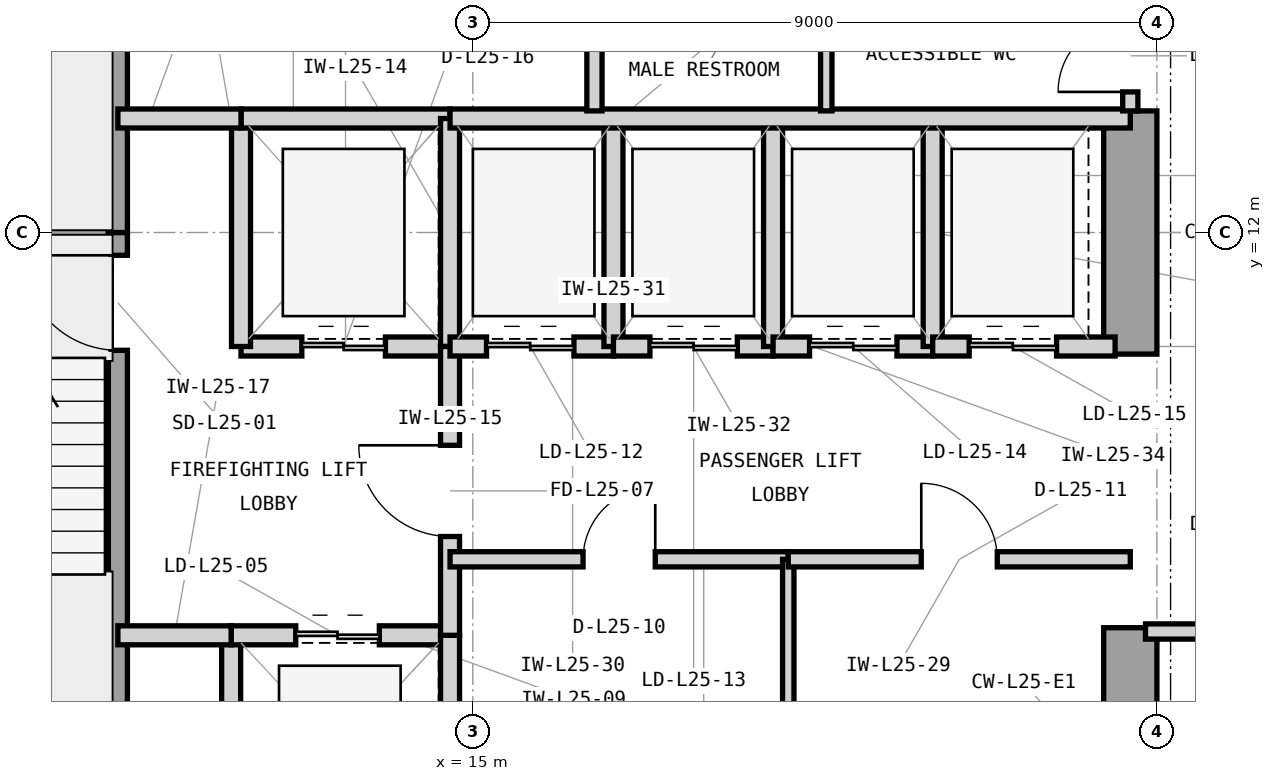
"""IFC4 building model, lengths in metres.
Left out: names, types, materials, properties, quantities, classifications, styles, units other than length and angle.
Written with IfcOpenShell. Run it as: python <this file> out.ifc"""

import sys

from ifc_helpers import new_model, si_unit, direction, frame, frame_2d, origin, place, context, subcontext, project, spatial, rectangle, extrude, element, fill, save


model = new_model("IFC4")
c1 = context("Model", 3, precision=1e-05, world=origin(), true_north=direction((0.0, 1.0)))
c2 = subcontext(c1, "Body", "Model", "MODEL_VIEW")
j1 = project(units=[si_unit("LENGTHUNIT", "METRE"), si_unit("PLANEANGLEUNIT", "RADIAN")], contexts=[c1])
p1 = place(None, origin())
s1 = spatial("IfcSite", under=j1, at=p1, CompositionType="ELEMENT")
p2 = place(p1, origin())
s2 = spatial("IfcBuilding", under=s1, at=p2, CompositionType="ELEMENT")
p3 = place(p2, frame((0.0, 0.0, 108.9)))
s3 = spatial("IfcBuildingStorey", under=s2, at=p3, CompositionType="ELEMENT", Elevation=108.9)
p4 = place(p3, frame((23.65, 3.7, 0.0), z_axis=(0.0, 0.0, 1.0), x_axis=(0.0, 1.0, 0.0)))
e1 = element("IfcWall", 1, at=p4, inside=s3, PredefinedType="SHEAR", context=c2, shape_type="SweptSolid", body=[
    extrude(rectangle(XDim=3.1, YDim=0.7, at=frame_2d((1.55, 0.0))), origin(), (0.0, 0.0, 1.0), 3.9),
])
p5 = place(p3, frame((23.65, 10.4, 0.0), z_axis=(0.0, 0.0, 1.0), x_axis=(0.0, 1.0, 0.0)))
e2 = element("IfcWall", 2, at=p5, inside=s3, PredefinedType="SHEAR", context=c2, shape_type="SweptSolid", body=[
    extrude(rectangle(XDim=3.2, YDim=0.7, at=frame_2d((1.6, 0.0))), origin(), (0.0, 0.0, 1.0), 3.9),
])
p6 = place(p3, frame((6.35, 12.0, 0.0), z_axis=(0.0, 0.0, 1.0), x_axis=(1.0, 0.0, 0.0)))
e3 = element("IfcWall", 3, at=p6, inside=s3, PredefinedType="SHEAR", context=c2, shape_type="SweptSolid", body=[
    extrude(rectangle(XDim=4.105, YDim=0.25, at=frame_2d((2.052, 0.0))), origin(), (0.0, 0.0, 1.0), 3.9),
])
p7 = place(p3, frame((10.33, 4.55, 0.0), z_axis=(0.0, 0.0, 1.0), x_axis=(0.0, 1.0, 0.0)))
e4 = element("IfcWall", 4, at=p7, inside=s3, PredefinedType="SHEAR", context=c2, shape_type="SweptSolid", body=[
    extrude(rectangle(XDim=7.45, YDim=0.25, at=frame_2d((3.725, 0.0))), origin(), (0.0, 0.0, 1.0), 3.9),
])
p8 = place(p7, frame((5.9, 0.0, 0.0)))
e5 = element("IfcOpeningElement", 5, at=p8, cuts=e4, PredefinedType="OPENING", context=c2, shape_type="SweptSolid", body=[
    extrude(rectangle(XDim=1.25, YDim=2.2, at=frame_2d((0.625, 1.1))), frame((0.0, 0.135, 0.0), z_axis=(0.0, -1.0, 0.0), x_axis=(1.0, 0.0, 0.0)), (0.0, 0.0, 1.0), 0.27),
])
p9 = place(p3, frame((10.33, 12.0, 0.0), z_axis=(0.0, 0.0, 1.0), x_axis=(0.0, 1.0, 0.0)))
e6 = element("IfcWall", 6, at=p9, inside=s3, PredefinedType="SHEAR", context=c2, shape_type="SweptSolid", body=[
    extrude(rectangle(XDim=7.45, YDim=0.25, at=frame_2d((3.725, 0.0))), origin(), (0.0, 0.0, 1.0), 3.9),
])
p10 = place(p9, frame((5.85, 0.0, 0.0)))
e7 = element("IfcOpeningElement", 7, at=p10, cuts=e6, PredefinedType="OPENING", context=c2, shape_type="SweptSolid", body=[
    extrude(rectangle(XDim=1.25, YDim=2.2, at=frame_2d((0.625, 1.1))), frame((0.0, 0.135, 0.0), z_axis=(0.0, -1.0, 0.0), x_axis=(1.0, 0.0, 0.0)), (0.0, 0.0, 1.0), 0.27),
])
p11 = place(p3, frame((11.82, 3.35, 0.0), z_axis=(0.0, 0.0, 1.0), x_axis=(0.0, 1.0, 0.0)))
e8 = element("IfcWall", 8, at=p11, inside=s3, PredefinedType="PARTITIONING", context=c2, shape_type="SweptSolid", body=[
    extrude(rectangle(XDim=3.35, YDim=0.25, at=frame_2d((1.675, 0.0))), origin(), (0.0, 0.0, 1.0), 3.69),
])
p12 = place(p3, frame((11.82, 6.7, 0.0), z_axis=(0.0, 0.0, 1.0), x_axis=(1.0, 0.0, 0.0)))
e9 = element("IfcWall", 9, at=p12, inside=s3, PredefinedType="PARTITIONING", context=c2, shape_type="SweptSolid", body=[
    extrude(rectangle(XDim=2.88, YDim=0.25, at=frame_2d((1.44, 0.0))), origin(), (0.0, 0.0, 1.0), 3.227),
])
p13 = place(p12, frame((0.85, 0.0, 0.0)))
e10 = element("IfcOpeningElement", 10, at=p13, cuts=e9, PredefinedType="OPENING", context=c2, shape_type="SweptSolid", body=[
    extrude(rectangle(XDim=1.1, YDim=2.25, at=frame_2d((0.55, 1.125))), frame((0.0, 0.135, 0.0), z_axis=(0.0, -1.0, 0.0), x_axis=(1.0, 0.0, 0.0)), (0.0, 0.0, 1.0), 0.27),
])
p14 = place(p3, frame((14.7, 3.35, 0.0), z_axis=(0.0, 0.0, 1.0), x_axis=(0.0, 1.0, 0.0)))
e11 = element("IfcWall", 11, at=p14, inside=s3, PredefinedType="PARTITIONING", context=c2, shape_type="SweptSolid", body=[
    extrude(rectangle(XDim=3.35, YDim=0.25, at=frame_2d((1.675, 0.0))), origin(), (0.0, 0.0, 1.0), 3.69),
])
p15 = place(p3, frame((11.95, 10.5, 0.0), z_axis=(0.0, 0.0, 1.0), x_axis=(1.0, 0.0, 0.0)))
e12 = element("IfcWall", 12, at=p15, inside=s3, PredefinedType="PARTITIONING", context=c2, shape_type="SweptSolid", body=[
    extrude(rectangle(XDim=2.75, YDim=0.25, at=frame_2d((1.375, 0.0))), origin(), (0.0, 0.0, 1.0), 3.227),
])
p16 = place(p15, frame((0.8, 0.0, 0.0)))
e13 = element("IfcOpeningElement", 13, at=p16, cuts=e12, PredefinedType="OPENING", context=c2, shape_type="SweptSolid", body=[
    extrude(rectangle(XDim=1.1, YDim=2.25, at=frame_2d((0.55, 1.125))), frame((0.0, 0.135, 0.0), z_axis=(0.0, -1.0, 0.0), x_axis=(1.0, 0.0, 0.0)), (0.0, 0.0, 1.0), 0.27),
])
p17 = place(p3, frame((11.95, 10.5, 0.0), z_axis=(0.0, 0.0, 1.0), x_axis=(0.0, 1.0, 0.0)))
e14 = element("IfcWall", 14, at=p17, inside=s3, PredefinedType="PARTITIONING", context=c2, shape_type="SweptSolid", body=[
    extrude(rectangle(XDim=3.0, YDim=0.25, at=frame_2d((1.5, 0.0))), origin(), (0.0, 0.0, 1.0), 3.69),
])
p18 = place(p3, frame((11.95, 13.5, 0.0), z_axis=(0.0, 0.0, 1.0), x_axis=(1.0, 0.0, 0.0)))
e15 = element("IfcWall", 15, at=p18, inside=s3, PredefinedType="PARTITIONING", context=c2, shape_type="SweptSolid", body=[
    extrude(rectangle(XDim=2.75, YDim=0.25, at=frame_2d((1.375, 0.0))), origin(), (0.0, 0.0, 1.0), 3.227),
])
p19 = place(p3, frame((14.7, 10.5, 0.0), z_axis=(0.0, 0.0, 1.0), x_axis=(0.0, 1.0, 0.0)))
e16 = element("IfcWall", 16, at=p19, inside=s3, PredefinedType="PARTITIONING", context=c2, shape_type="SweptSolid", body=[
    extrude(rectangle(XDim=3.0, YDim=0.25, at=frame_2d((1.5, 0.0))), origin(), (0.0, 0.0, 1.0), 3.69),
])
p20 = place(p3, frame((14.7, 6.7, 0.0), z_axis=(0.0, 0.0, 1.0), x_axis=(0.0, 1.0, 0.0)))
e17 = element("IfcWall", 17, at=p20, inside=s3, PredefinedType="PARTITIONING", context=c2, shape_type="SweptSolid", body=[
    extrude(rectangle(XDim=3.8, YDim=0.25, at=frame_2d((1.9, 0.0))), origin(), (0.0, 0.0, 1.0), 3.69),
])
p21 = place(p20, frame((1.3, 0.0, 0.0)))
e18 = element("IfcOpeningElement", 18, at=p21, cuts=e17, PredefinedType="OPENING", context=c2, shape_type="SweptSolid", body=[
    extrude(rectangle(XDim=1.2, YDim=2.2, at=frame_2d((0.6, 1.1))), frame((0.0, 0.135, 0.0), z_axis=(0.0, -1.0, 0.0), x_axis=(1.0, 0.0, 0.0)), (0.0, 0.0, 1.0), 0.27),
])
p22 = place(p3, frame((10.33, 13.5, 0.0), z_axis=(0.0, 0.0, 1.0), x_axis=(1.0, 0.0, 0.0)))
e19 = element("IfcWall", 19, at=p22, inside=s3, PredefinedType="PARTITIONING", context=c2, shape_type="SweptSolid", body=[
    extrude(rectangle(XDim=1.62, YDim=0.25, at=frame_2d((0.81, 0.0))), origin(), (0.0, 0.0, 1.0), 3.227),
])
p23 = place(p3, frame((10.33, 6.7, 0.0), z_axis=(0.0, 0.0, 1.0), x_axis=(1.0, 0.0, 0.0)))
e20 = element("IfcWall", 20, at=p23, inside=s3, PredefinedType="PARTITIONING", context=c2, shape_type="SweptSolid", body=[
    extrude(rectangle(XDim=1.49, YDim=0.25, at=frame_2d((0.745, 0.0))), origin(), (0.0, 0.0, 1.0), 3.227),
])
p24 = place(p3, frame((14.7, 7.7, 0.0), z_axis=(0.0, 0.0, 1.0), x_axis=(1.0, 0.0, 0.0)))
e21 = element("IfcWall", 21, at=p24, inside=s3, PredefinedType="PARTITIONING", context=c2, shape_type="SweptSolid", body=[
    extrude(rectangle(XDim=4.45, YDim=0.2, at=frame_2d((2.225, 0.0))), origin(), (0.0, 0.0, 1.0), 3.69),
])
p25 = place(p24, frame((1.75, 0.0, 0.0)))
e22 = element("IfcOpeningElement", 22, at=p25, cuts=e21, PredefinedType="OPENING", context=c2, shape_type="SweptSolid", body=[
    extrude(rectangle(XDim=0.95, YDim=2.1, at=frame_2d((0.475, 1.05))), frame((0.0, 0.11, 0.0), z_axis=(0.0, -1.0, 0.0), x_axis=(1.0, 0.0, 0.0)), (0.0, 0.0, 1.0), 0.22),
])
p26 = place(p3, frame((19.15, 3.35, 0.0), z_axis=(0.0, 0.0, 1.0), x_axis=(0.0, 1.0, 0.0)))
e23 = element("IfcWall", 23, at=p26, inside=s3, PredefinedType="PARTITIONING", context=c2, shape_type="SweptSolid", body=[
    extrude(rectangle(XDim=4.35, YDim=0.15, at=frame_2d((2.175, 0.0))), origin(), (0.0, 0.0, 1.0), 3.69),
])
p27 = place(p3, frame((19.15, 7.7, 0.0), z_axis=(0.0, 0.0, 1.0), x_axis=(1.0, 0.0, 0.0)))
e24 = element("IfcWall", 24, at=p27, inside=s3, PredefinedType="PARTITIONING", context=c2, shape_type="SweptSolid", body=[
    extrude(rectangle(XDim=4.5, YDim=0.2, at=frame_2d((2.25, 0.0))), origin(), (0.0, 0.0, 1.0), 3.69),
])
p28 = place(p27, frame((1.75, 0.0, 0.0)))
e25 = element("IfcOpeningElement", 25, at=p28, cuts=e24, PredefinedType="OPENING", context=c2, shape_type="SweptSolid", body=[
    extrude(rectangle(XDim=1.0, YDim=2.15, at=frame_2d((0.5, 1.075))), frame((0.0, 0.11, 0.0), z_axis=(0.0, -1.0, 0.0), x_axis=(1.0, 0.0, 0.0)), (0.0, 0.0, 1.0), 0.22),
])
p29 = place(p3, frame((14.7, 10.5, 0.0), z_axis=(0.0, 0.0, 1.0), x_axis=(1.0, 0.0, 0.0)))
e26 = element("IfcWall", 26, at=p29, inside=s3, PredefinedType="PARTITIONING", context=c2, shape_type="SweptSolid", body=[
    extrude(rectangle(XDim=2.15, YDim=0.25, at=frame_2d((1.075, 0.0))), origin(), (0.0, 0.0, 1.0), 3.227),
])
p30 = place(p29, frame((0.48, 0.0, 0.0)))
e27 = element("IfcOpeningElement", 27, at=p30, cuts=e26, PredefinedType="OPENING", context=c2, shape_type="SweptSolid", body=[
    extrude(rectangle(XDim=1.15, YDim=2.25, at=frame_2d((0.575, 1.125))), frame((0.0, 0.135, 0.0), z_axis=(0.0, -1.0, 0.0), x_axis=(1.0, 0.0, 0.0)), (0.0, 0.0, 1.0), 0.27),
])
p31 = place(p3, frame((16.85, 10.5, 0.0), z_axis=(0.0, 0.0, 1.0), x_axis=(0.0, 1.0, 0.0)))
e28 = element("IfcWall", 28, at=p31, inside=s3, PredefinedType="PARTITIONING", context=c2, shape_type="SweptSolid", body=[
    extrude(rectangle(XDim=3.0, YDim=0.25, at=frame_2d((1.5, 0.0))), origin(), (0.0, 0.0, 1.0), 3.69),
])
p32 = place(p3, frame((16.85, 10.5, 0.0), z_axis=(0.0, 0.0, 1.0), x_axis=(1.0, 0.0, 0.0)))
e29 = element("IfcWall", 29, at=p32, inside=s3, PredefinedType="PARTITIONING", context=c2, shape_type="SweptSolid", body=[
    extrude(rectangle(XDim=2.1, YDim=0.25, at=frame_2d((1.05, 0.0))), origin(), (0.0, 0.0, 1.0), 3.227),
])
p33 = place(p32, frame((0.48, 0.0, 0.0)))
e30 = element("IfcOpeningElement", 30, at=p33, cuts=e29, PredefinedType="OPENING", context=c2, shape_type="SweptSolid", body=[
    extrude(rectangle(XDim=1.15, YDim=2.25, at=frame_2d((0.575, 1.125))), frame((0.0, 0.135, 0.0), z_axis=(0.0, -1.0, 0.0), x_axis=(1.0, 0.0, 0.0)), (0.0, 0.0, 1.0), 0.27),
])
p34 = place(p3, frame((18.95, 10.5, 0.0), z_axis=(0.0, 0.0, 1.0), x_axis=(0.0, 1.0, 0.0)))
e31 = element("IfcWall", 31, at=p34, inside=s3, PredefinedType="PARTITIONING", context=c2, shape_type="SweptSolid", body=[
    extrude(rectangle(XDim=3.0, YDim=0.25, at=frame_2d((1.5, 0.0))), origin(), (0.0, 0.0, 1.0), 3.69),
])
p35 = place(p3, frame((18.95, 10.5, 0.0), z_axis=(0.0, 0.0, 1.0), x_axis=(1.0, 0.0, 0.0)))
e32 = element("IfcWall", 32, at=p35, inside=s3, PredefinedType="PARTITIONING", context=c2, shape_type="SweptSolid", body=[
    extrude(rectangle(XDim=2.1, YDim=0.25, at=frame_2d((1.05, 0.0))), origin(), (0.0, 0.0, 1.0), 3.227),
])
p36 = place(p35, frame((0.48, 0.0, 0.0)))
e33 = element("IfcOpeningElement", 33, at=p36, cuts=e32, PredefinedType="OPENING", context=c2, shape_type="SweptSolid", body=[
    extrude(rectangle(XDim=1.15, YDim=2.25, at=frame_2d((0.575, 1.125))), frame((0.0, 0.135, 0.0), z_axis=(0.0, -1.0, 0.0), x_axis=(1.0, 0.0, 0.0)), (0.0, 0.0, 1.0), 0.27),
])
p37 = place(p3, frame((21.05, 10.5, 0.0), z_axis=(0.0, 0.0, 1.0), x_axis=(0.0, 1.0, 0.0)))
e34 = element("IfcWall", 34, at=p37, inside=s3, PredefinedType="PARTITIONING", context=c2, shape_type="SweptSolid", body=[
    extrude(rectangle(XDim=3.0, YDim=0.25, at=frame_2d((1.5, 0.0))), origin(), (0.0, 0.0, 1.0), 3.69),
])
p38 = place(p3, frame((21.05, 10.5, 0.0), z_axis=(0.0, 0.0, 1.0), x_axis=(1.0, 0.0, 0.0)))
e35 = element("IfcWall", 35, at=p38, inside=s3, PredefinedType="PARTITIONING", context=c2, shape_type="SweptSolid", body=[
    extrude(rectangle(XDim=2.4, YDim=0.25, at=frame_2d((1.2, 0.0))), origin(), (0.0, 0.0, 1.0), 3.227),
])
p39 = place(p38, frame((0.48, 0.0, 0.0)))
e36 = element("IfcOpeningElement", 36, at=p39, cuts=e35, PredefinedType="OPENING", context=c2, shape_type="SweptSolid", body=[
    extrude(rectangle(XDim=1.15, YDim=2.25, at=frame_2d((0.575, 1.125))), frame((0.0, 0.135, 0.0), z_axis=(0.0, -1.0, 0.0), x_axis=(1.0, 0.0, 0.0)), (0.0, 0.0, 1.0), 0.27),
])
p40 = place(p3, frame((14.7, 13.5, 0.0), z_axis=(0.0, 0.0, 1.0), x_axis=(1.0, 0.0, 0.0)))
e37 = element("IfcWall", 37, at=p40, inside=s3, PredefinedType="PARTITIONING", context=c2, shape_type="SweptSolid", body=[
    extrude(rectangle(XDim=8.95, YDim=0.25, at=frame_2d((4.475, 0.0))), origin(), (0.0, 0.0, 1.0), 3.227),
])
p41 = place(p3, frame((16.6, 13.6, 0.0), z_axis=(0.0, 0.0, 1.0), x_axis=(0.0, 1.0, 0.0)))
e38 = element("IfcWall", 38, at=p41, inside=s3, PredefinedType="PARTITIONING", context=c2, shape_type="SweptSolid", body=[
    extrude(rectangle(XDim=3.0, YDim=0.2, at=frame_2d((1.5, 0.0))), origin(), (0.0, 0.0, 1.0), 3.69),
])
p42 = place(p41, frame((1.02, 0.0, 0.0)))
e39 = element("IfcOpeningElement", 39, at=p42, cuts=e38, PredefinedType="OPENING", context=c2, shape_type="SweptSolid", body=[
    extrude(rectangle(XDim=0.95, YDim=2.1, at=frame_2d((0.475, 1.05))), frame((0.0, 0.11, 0.0), z_axis=(0.0, -1.0, 0.0), x_axis=(1.0, 0.0, 0.0)), (0.0, 0.0, 1.0), 0.22),
])
p43 = place(p3, frame((19.65, 13.6, 0.0), z_axis=(0.0, 0.0, 1.0), x_axis=(0.0, 1.0, 0.0)))
e40 = element("IfcWall", 40, at=p43, inside=s3, PredefinedType="PARTITIONING", context=c2, shape_type="SweptSolid", body=[
    extrude(rectangle(XDim=3.0, YDim=0.15, at=frame_2d((1.5, 0.0))), origin(), (0.0, 0.0, 1.0), 3.69),
])
p44 = place(p3, frame((23.65, 13.6, 0.0), z_axis=(0.0, 0.0, 1.0), x_axis=(0.0, 1.0, 0.0)))
e41 = element("IfcWall", 41, at=p44, inside=s3, PredefinedType="PARTITIONING", context=c2, shape_type="SweptSolid", body=[
    extrude(rectangle(XDim=3.0, YDim=0.2, at=frame_2d((1.5, 0.0))), origin(), (0.0, 0.0, 1.0), 3.69),
])
p45 = place(p44, frame((0.25, 0.0, 0.0)))
e42 = element("IfcOpeningElement", 42, at=p45, cuts=e41, PredefinedType="OPENING", context=c2, shape_type="SweptSolid", body=[
    extrude(rectangle(XDim=0.95, YDim=2.1, at=frame_2d((0.475, 1.05))), frame((0.0, 0.11, 0.0), z_axis=(0.0, -1.0, 0.0), x_axis=(1.0, 0.0, 0.0)), (0.0, 0.0, 1.0), 0.22),
])
p46 = place(p44, frame((1.8, 0.0, 0.0)))
e43 = element("IfcOpeningElement", 43, at=p46, cuts=e41, PredefinedType="OPENING", context=c2, shape_type="SweptSolid", body=[
    extrude(rectangle(XDim=0.95, YDim=2.1, at=frame_2d((0.475, 1.05))), frame((0.0, 0.11, 0.0), z_axis=(0.0, -1.0, 0.0), x_axis=(1.0, 0.0, 0.0)), (0.0, 0.0, 1.0), 0.22),
])
p47 = place(p3, frame((23.85, 6.75, 0.0), z_axis=(0.0, 0.0, 1.0), x_axis=(1.0, 0.0, 0.0)))
e44 = element("IfcWall", 44, at=p47, inside=s3, PredefinedType="PARTITIONING", context=c2, shape_type="SweptSolid", body=[
    extrude(rectangle(XDim=2.85, YDim=0.2, at=frame_2d((1.425, 0.0))), origin(), (0.0, 0.0, 1.0), 3.69),
])
p48 = place(p47, frame((0.7, 0.0, 0.0)))
e45 = element("IfcOpeningElement", 45, at=p48, cuts=e44, PredefinedType="OPENING", context=c2, shape_type="SweptSolid", body=[
    extrude(rectangle(XDim=1.0, YDim=2.15, at=frame_2d((0.5, 1.075))), frame((0.0, 0.11, 0.0), z_axis=(0.0, -1.0, 0.0), x_axis=(1.0, 0.0, 0.0)), (0.0, 0.0, 1.0), 0.22),
])
p49 = place(p8, origin())
e46 = element("IfcDoor", 46, at=p49, inside=s3, OperationType="SINGLE_SWING_RIGHT", PredefinedType="DOOR", context=c2, shape_type="SweptSolid", body=[
    extrude(rectangle(XDim=1.25, YDim=2.2, at=frame_2d((0.625, 1.1))), frame((0.0, 0.025, 0.0), z_axis=(0.0, -1.0, 0.0), x_axis=(1.0, 0.0, 0.0)), (0.0, 0.0, 1.0), 0.05),
])
fill(e5, e46)
p50 = place(p13, origin())
e47 = element("IfcDoor", 47, at=p50, inside=s3, OperationType="DOUBLE_DOOR_SLIDING", PredefinedType="DOOR", context=c2, shape_type="SweptSolid", body=[
    extrude(rectangle(XDim=1.1, YDim=2.25, at=frame_2d((0.55, 1.125))), frame((0.0, 0.025, 0.0), z_axis=(0.0, -1.0, 0.0), x_axis=(1.0, 0.0, 0.0)), (0.0, 0.0, 1.0), 0.05),
])
fill(e10, e47)
p51 = place(p16, origin())
e48 = element("IfcDoor", 48, at=p51, inside=s3, OperationType="DOUBLE_DOOR_SLIDING", PredefinedType="DOOR", context=c2, shape_type="SweptSolid", body=[
    extrude(rectangle(XDim=1.1, YDim=2.25, at=frame_2d((0.55, 1.125))), frame((0.0, 0.025, 0.0), z_axis=(0.0, -1.0, 0.0), x_axis=(1.0, 0.0, 0.0)), (0.0, 0.0, 1.0), 0.05),
])
fill(e13, e48)
p52 = place(p21, origin())
e49 = element("IfcDoor", 49, at=p52, inside=s3, OperationType="SINGLE_SWING_RIGHT", PredefinedType="DOOR", context=c2, shape_type="SweptSolid", body=[
    extrude(rectangle(XDim=1.2, YDim=2.2, at=frame_2d((0.6, 1.1))), frame((0.0, 0.025, 0.0), z_axis=(0.0, -1.0, 0.0), x_axis=(1.0, 0.0, 0.0)), (0.0, 0.0, 1.0), 0.05),
])
fill(e18, e49)
p53 = place(p25, origin())
e50 = element("IfcDoor", 50, at=p53, inside=s3, OperationType="SINGLE_SWING_RIGHT", PredefinedType="DOOR", context=c2, shape_type="SweptSolid", body=[
    extrude(rectangle(XDim=0.95, YDim=2.1, at=frame_2d((0.475, 1.05))), frame((0.0, 0.025, 0.0), z_axis=(0.0, -1.0, 0.0), x_axis=(1.0, 0.0, 0.0)), (0.0, 0.0, 1.0), 0.05),
])
fill(e22, e50)
p54 = place(p28, origin())
e51 = element("IfcDoor", 51, at=p54, inside=s3, OperationType="SINGLE_SWING_LEFT", PredefinedType="DOOR", context=c2, shape_type="SweptSolid", body=[
    extrude(rectangle(XDim=1.0, YDim=2.15, at=frame_2d((0.5, 1.075))), frame((0.0, 0.025, 0.0), z_axis=(0.0, -1.0, 0.0), x_axis=(1.0, 0.0, 0.0)), (0.0, 0.0, 1.0), 0.05),
])
fill(e25, e51)
p55 = place(p30, origin())
e52 = element("IfcDoor", 52, at=p55, inside=s3, OperationType="DOUBLE_DOOR_SLIDING", PredefinedType="DOOR", context=c2, shape_type="SweptSolid", body=[
    extrude(rectangle(XDim=1.15, YDim=2.25, at=frame_2d((0.575, 1.125))), frame((0.0, 0.025, 0.0), z_axis=(0.0, -1.0, 0.0), x_axis=(1.0, 0.0, 0.0)), (0.0, 0.0, 1.0), 0.05),
])
fill(e27, e52)
p56 = place(p33, origin())
e53 = element("IfcDoor", 53, at=p56, inside=s3, OperationType="DOUBLE_DOOR_SLIDING", PredefinedType="DOOR", context=c2, shape_type="SweptSolid", body=[
    extrude(rectangle(XDim=1.15, YDim=2.25, at=frame_2d((0.575, 1.125))), frame((0.0, 0.025, 0.0), z_axis=(0.0, -1.0, 0.0), x_axis=(1.0, 0.0, 0.0)), (0.0, 0.0, 1.0), 0.05),
])
fill(e30, e53)
p57 = place(p36, origin())
e54 = element("IfcDoor", 54, at=p57, inside=s3, OperationType="DOUBLE_DOOR_SLIDING", PredefinedType="DOOR", context=c2, shape_type="SweptSolid", body=[
    extrude(rectangle(XDim=1.15, YDim=2.25, at=frame_2d((0.575, 1.125))), frame((0.0, 0.025, 0.0), z_axis=(0.0, -1.0, 0.0), x_axis=(1.0, 0.0, 0.0)), (0.0, 0.0, 1.0), 0.05),
])
fill(e33, e54)
p58 = place(p39, origin())
e55 = element("IfcDoor", 55, at=p58, inside=s3, OperationType="DOUBLE_DOOR_SLIDING", PredefinedType="DOOR", context=c2, shape_type="SweptSolid", body=[
    extrude(rectangle(XDim=1.15, YDim=2.25, at=frame_2d((0.575, 1.125))), frame((0.0, 0.025, 0.0), z_axis=(0.0, -1.0, 0.0), x_axis=(1.0, 0.0, 0.0)), (0.0, 0.0, 1.0), 0.05),
])
fill(e36, e55)
p59 = place(p45, origin())
e56 = element("IfcDoor", 56, at=p59, inside=s3, OperationType="SINGLE_SWING_LEFT", PredefinedType="DOOR", context=c2, shape_type="SweptSolid", body=[
    extrude(rectangle(XDim=0.95, YDim=2.1, at=frame_2d((0.475, 1.05))), frame((0.0, 0.025, 0.0), z_axis=(0.0, -1.0, 0.0), x_axis=(1.0, 0.0, 0.0)), (0.0, 0.0, 1.0), 0.05),
])
fill(e42, e56)
save(model, sys.argv[1])
